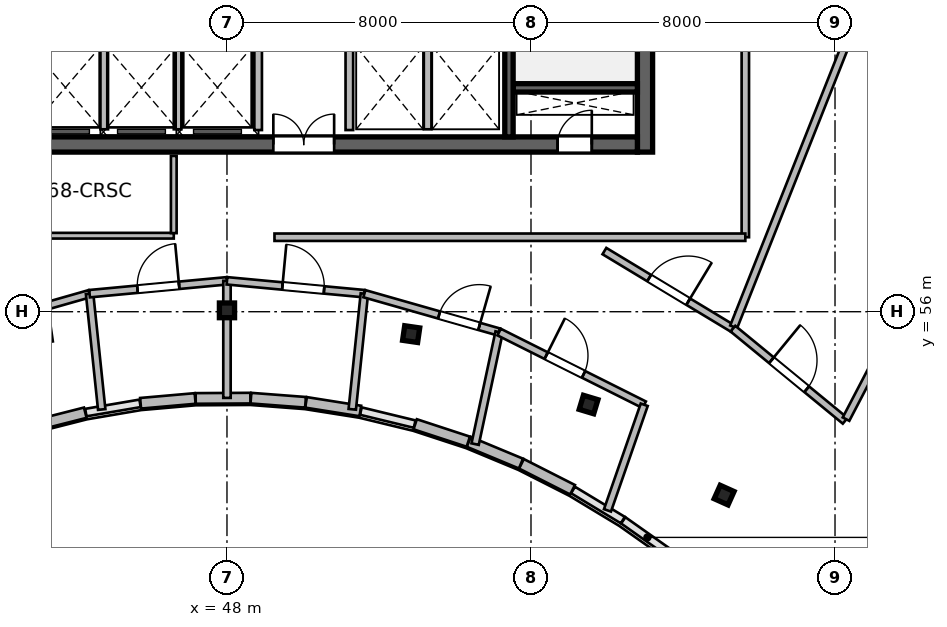
"""IFC4 building model, lengths in metres.
Left out: names, types, materials, properties, quantities, classifications, styles, units other than length and angle.
Written with IfcOpenShell. Run it as: python <this file> out.ifc"""

import sys

from ifc_helpers import new_model, si_unit, direction, frame, frame_2d, origin, origin_2d, place, context, subcontext, project, spatial, rectangle, i_section, extrude, source, transform, mapped, element, fill, save


model = new_model("IFC4")
c1 = context("Model", 3, precision=1e-05, world=origin(), true_north=direction((0.0, 1.0)))
c2 = subcontext(c1, "Body", "Model", "MODEL_VIEW")
j1 = project(units=[si_unit("LENGTHUNIT", "METRE"), si_unit("PLANEANGLEUNIT", "RADIAN")], contexts=[c1])
p1 = place(None, origin())
s1 = spatial("IfcSite", under=j1, at=p1, CompositionType="ELEMENT")
p2 = place(p1, origin())
s2 = spatial("IfcBuilding", under=s1, at=p2, CompositionType="ELEMENT")
p3 = place(p2, frame((0.0, 0.0, 279.6)))
s3 = spatial("IfcBuildingStorey", under=s2, at=p3, CompositionType="ELEMENT", Elevation=279.6)
m1 = source(origin(), c2, "Body", "SweptSolid", [
    extrude(rectangle(XDim=12.0, YDim=0.4, at=frame_2d((6.0, 0.0))), origin(), (0.0, 0.0, 1.0), 3.9),
])
p4 = place(p3, frame((59.0, 60.2, 0.0), z_axis=(0.0, 0.0, 1.0), x_axis=(0.0, 1.0, 0.0)))
e1 = element("IfcWall", 1, at=p4, inside=s3, PredefinedType="SHEAR", context=c2, shape_type="MappedRepresentation", body=[
    mapped(m1, transform((0.0, 0.0, 0.0), scale=1.0)),
])
m2 = source(origin(), c2, "Body", "SweptSolid", [
    extrude(rectangle(XDim=21.6, YDim=0.4, at=frame_2d((10.8, 0.0))), origin(), (0.0, 0.0, 1.0), 3.9),
])
p5 = place(p3, frame((37.2, 60.4, 0.0), z_axis=(0.0, 0.0, 1.0), x_axis=(1.0, 0.0, 0.0)))
e2 = element("IfcWall", 2, at=p5, inside=s3, PredefinedType="SHEAR", context=c2, shape_type="MappedRepresentation", body=[
    mapped(m2, transform((0.0, 0.0, 0.0), scale=1.0)),
])
p6 = place(p5, frame((1.1, 0.0, 0.0)))
e3 = element("IfcOpeningElement", 3, at=p6, cuts=e2, PredefinedType="OPENING", context=c2, shape_type="SweptSolid", body=[
    extrude(rectangle(XDim=1.15, YDim=2.15, at=frame_2d((0.575, 1.075))), frame((0.0, 0.21, 0.0), z_axis=(0.0, -1.0, 0.0), x_axis=(1.0, 0.0, 0.0)), (0.0, 0.0, 1.0), 0.42),
])
p7 = place(p5, frame((19.5, 0.0, 0.0)))
e4 = element("IfcOpeningElement", 4, at=p7, cuts=e2, PredefinedType="OPENING", context=c2, shape_type="SweptSolid", body=[
    extrude(rectangle(XDim=0.9, YDim=2.1, at=frame_2d((0.45, 1.05))), frame((0.0, 0.21, 0.0), z_axis=(0.0, -1.0, 0.0), x_axis=(1.0, 0.0, 0.0)), (0.0, 0.0, 1.0), 0.42),
])
p8 = place(p5, frame((12.02, 0.0, 0.0)))
e5 = element("IfcOpeningElement", 5, at=p8, cuts=e2, PredefinedType="OPENING", context=c2, shape_type="SweptSolid", body=[
    extrude(rectangle(XDim=1.6, YDim=2.15, at=frame_2d((0.8, 1.075))), frame((0.0, 0.21, 0.0), z_axis=(0.0, -1.0, 0.0), x_axis=(1.0, 0.0, 0.0)), (0.0, 0.0, 1.0), 0.42),
])
m3 = source(origin(), c2, "Body", "SweptSolid", [
    extrude(rectangle(XDim=3.27, YDim=0.22, at=frame_2d((1.635, 0.0))), origin(), (0.0, 0.0, 1.0), 3.9),
])
p9 = place(p3, frame((55.53, 61.89, 0.0), z_axis=(0.0, 0.0, 1.0), x_axis=(1.0, 0.0, 0.0)))
e6 = element("IfcWall", 6, at=p9, inside=s3, PredefinedType="SHEAR", context=c2, shape_type="MappedRepresentation", body=[
    mapped(m3, transform((0.0, 0.0, 0.0), scale=1.0)),
])
m4 = source(origin(), c2, "Body", "SweptSolid", [
    extrude(rectangle(XDim=11.2, YDim=0.22, at=frame_2d((5.6, 0.0))), origin(), (0.0, 0.0, 1.0), 3.9),
])
p10 = place(p3, frame((55.42, 60.6, 0.0), z_axis=(0.0, 0.0, 1.0), x_axis=(0.0, 1.0, 0.0)))
e7 = element("IfcWall", 7, at=p10, inside=s3, PredefinedType="SHEAR", context=c2, shape_type="MappedRepresentation", body=[
    mapped(m4, transform((0.0, 0.0, 0.0), scale=1.0)),
])
p11 = place(p10, frame((9.645, 0.0, 0.0)))
e8 = element("IfcOpeningElement", 8, at=p11, cuts=e7, PredefinedType="OPENING", context=c2, shape_type="SweptSolid", body=[
    extrude(rectangle(XDim=1.15, YDim=2.15, at=frame_2d((0.575, 1.075))), frame((0.0, 0.12, 0.0), z_axis=(0.0, -1.0, 0.0), x_axis=(1.0, 0.0, 0.0)), (0.0, 0.0, 1.0), 0.24),
])
m5 = source(origin(), c2, "Body", "SweptSolid", [
    extrude(i_section(OverallWidth=0.399, OverallDepth=0.387, WebThickness=0.021, FlangeThickness=0.033, at=origin_2d()), origin(), (0.0, 0.0, 1.0), 3.9),
])
for number, where, z_axis, x_axis in (
    (9, (48.0, 56.036, 0.0), (0.0, 0.0, 1.0), (0.0, 1.0, 0.0)),
    (10, (52.846, 55.411, 0.0), (0.0, 0.0, 1.0), (0.143, 0.99, 0.0)),
    (11, (57.515, 53.558, 0.0), (0.0, 0.0, 1.0), (0.289, 0.957, 0.0)),
    (12, (61.082, 51.175, 0.0), (0.0, 0.0, 1.0), (0.409, 0.912, 0.0)),
):
    element("IfcColumn", number, at=place(p3, frame(where, z_axis=z_axis, x_axis=x_axis)), inside=s3, PredefinedType="COLUMN", context=c2, shape_type="MappedRepresentation", body=[
        mapped(m5, transform((0.0, 0.0, 0.0), scale=1.0)),
    ])
m6 = source(origin(), c2, "Body", "SweptSolid", [
    extrude(rectangle(XDim=1.509, YDim=0.28, at=frame_2d((0.754, 0.0))), origin(), (0.0, 0.0, 1.0), 3.64),
])
p12 = place(p3, frame((57.094, 51.315, 0.0), z_axis=(0.0, 0.0, 1.0), x_axis=(-0.89169189228, 0.452642871635, 0.0)))
e13 = element("IfcWall", 13, at=p12, inside=s3, PredefinedType="SOLIDWALL", context=c2, shape_type="MappedRepresentation", body=[
    mapped(m6, transform((0.0, 0.0, 0.0), scale=1.0)),
])
m7 = source(origin(), c2, "Body", "SweptSolid", [
    extrude(rectangle(XDim=1.488, YDim=0.28, at=frame_2d((0.744, 0.0))), origin(), (0.0, 0.0, 1.0), 3.64),
])
p13 = place(p3, frame((55.736, 52.004, 0.0), z_axis=(0.0, 0.0, 1.0), x_axis=(-0.923261314935, 0.384172545017, 0.0)))
e14 = element("IfcWall", 14, at=p13, inside=s3, PredefinedType="SOLIDWALL", context=c2, shape_type="MappedRepresentation", body=[
    mapped(m7, transform((0.0, 0.0, 0.0), scale=1.0)),
])
m8 = source(origin(), c2, "Body", "SweptSolid", [
    extrude(rectangle(XDim=1.47, YDim=0.28, at=frame_2d((0.735, 0.0))), origin(), (0.0, 0.0, 1.0), 3.64),
])
p14 = place(p3, frame((54.35, 52.58, 0.0), z_axis=(0.0, 0.0, 1.0), x_axis=(-0.950248878954, 0.311491682145, 0.0)))
e15 = element("IfcWall", 15, at=p14, inside=s3, PredefinedType="SOLIDWALL", context=c2, shape_type="MappedRepresentation", body=[
    mapped(m8, transform((0.0, 0.0, 0.0), scale=1.0)),
])
m9 = source(origin(), c2, "Body", "SweptSolid", [
    extrude(rectangle(XDim=1.446, YDim=0.28, at=frame_2d((0.723, 0.0))), origin(), (0.0, 0.0, 1.0), 3.64),
])
p15 = place(p3, frame((51.509, 53.388, 0.0), z_axis=(0.0, 0.0, 1.0), x_axis=(-0.987650460941, 0.156673440642, 0.0)))
e16 = element("IfcWall", 16, at=p15, inside=s3, PredefinedType="SOLIDWALL", context=c2, shape_type="MappedRepresentation", body=[
    mapped(m9, transform((0.0, 0.0, 0.0), scale=1.0)),
])
m10 = source(origin(), c2, "Body", "SweptSolid", [
    extrude(rectangle(XDim=1.44, YDim=0.28, at=frame_2d((0.72, 0.0))), origin(), (0.0, 0.0, 1.0), 3.64),
])
p16 = place(p3, frame((50.066, 53.616, 0.0), z_axis=(0.0, 0.0, 1.0), x_axis=(-0.997124860794, 0.075776064736, 0.0)))
e17 = element("IfcWall", 17, at=p16, inside=s3, PredefinedType="SOLIDWALL", context=c2, shape_type="MappedRepresentation", body=[
    mapped(m10, transform((0.0, 0.0, 0.0), scale=1.0)),
])
m11 = source(origin(), c2, "Body", "SweptSolid", [
    extrude(rectangle(XDim=1.438, YDim=0.28, at=frame_2d((0.719, 0.0))), origin(), (0.0, 0.0, 1.0), 3.64),
])
p17 = place(p3, frame((48.615, 53.726, 0.0), z_axis=(0.0, 0.0, 1.0), x_axis=(-0.999982357135, -0.005940153174, 0.0)))
e18 = element("IfcWall", 18, at=p17, inside=s3, PredefinedType="SOLIDWALL", context=c2, shape_type="MappedRepresentation", body=[
    mapped(m11, transform((0.0, 0.0, 0.0), scale=1.0)),
])
m12 = source(origin(), c2, "Body", "SweptSolid", [
    extrude(rectangle(XDim=1.441, YDim=0.28, at=frame_2d((0.72, 0.0))), origin(), (0.0, 0.0, 1.0), 3.64),
])
p18 = place(p3, frame((47.162, 53.717, 0.0), z_axis=(0.0, 0.0, 1.0), x_axis=(-0.99617032352, -0.087433898101, 0.0)))
e19 = element("IfcWall", 19, at=p18, inside=s3, PredefinedType="SOLIDWALL", context=c2, shape_type="MappedRepresentation", body=[
    mapped(m12, transform((0.0, 0.0, 0.0), scale=1.0)),
])
m13 = source(origin(), c2, "Body", "SweptSolid", [
    extrude(rectangle(XDim=1.458, YDim=0.28, at=frame_2d((0.729, 0.0))), origin(), (0.0, 0.0, 1.0), 3.64),
])
p19 = place(p3, frame((44.271, 53.343, 0.0), z_axis=(0.0, 0.0, 1.0), x_axis=(-0.969109544438, -0.246630677083, 0.0)))
e20 = element("IfcWall", 20, at=p19, inside=s3, PredefinedType="SOLIDWALL", context=c2, shape_type="MappedRepresentation", body=[
    mapped(m13, transform((0.0, 0.0, 0.0), scale=1.0)),
])
m14 = source(origin(), c2, "Body", "SweptSolid", [
    extrude(rectangle(XDim=2.24, YDim=0.2, at=frame_2d((1.12, 0.0))), origin(), (0.0, 0.0, 1.0), 3.64),
])
for number, where, z_axis, x_axis in (
    (21, (48.82, 60.78, 0.0), (0.0, 0.0, 1.0), (0.0, 1.0, 0.0)),
    (22, (51.22, 60.78, 0.0), (0.0, 0.0, 1.0), (0.0, 1.0, 0.0)),
):
    element("IfcWall", number, at=place(p3, frame(where, z_axis=z_axis, x_axis=x_axis)), inside=s3, PredefinedType="SOLIDWALL", context=c2, shape_type="MappedRepresentation", body=[
        mapped(m14, transform((0.0, 0.0, 0.0), scale=1.0)),
    ])
m15 = source(origin(), c2, "Body", "SweptSolid", [
    extrude(rectangle(XDim=2.2, YDim=0.2, at=frame_2d((1.1, 0.0))), origin(), (0.0, 0.0, 1.0), 3.64),
])
for number, where, z_axis, x_axis in (
    (23, (44.77, 60.8, 0.0), (0.0, 0.0, 1.0), (0.0, 1.0, 0.0)),
    (24, (46.7, 60.8, 0.0), (0.0, 0.0, 1.0), (0.0, 1.0, 0.0)),
    (25, (53.28, 60.8, 0.0), (0.0, 0.0, 1.0), (0.0, 1.0, 0.0)),
):
    element("IfcWall", number, at=place(p3, frame(where, z_axis=z_axis, x_axis=x_axis)), inside=s3, PredefinedType="SOLIDWALL", context=c2, shape_type="MappedRepresentation", body=[
        mapped(m15, transform((0.0, 0.0, 0.0), scale=1.0)),
    ])
m16 = source(origin(), c2, "Body", "SweptSolid", [
    extrude(rectangle(XDim=5.4, YDim=0.15, at=frame_2d((2.7, 0.0))), origin(), (0.0, 0.0, 1.0), 3.64),
])
p20 = place(p3, frame((41.2, 58.0, 0.0), z_axis=(0.0, 0.0, 1.0), x_axis=(1.0, 0.0, 0.0)))
e26 = element("IfcWall", 26, at=p20, inside=s3, PredefinedType="PARTITIONING", context=c2, shape_type="MappedRepresentation", body=[
    mapped(m16, transform((0.0, 0.0, 0.0), scale=1.0)),
])
m17 = source(origin(), c2, "Body", "SweptSolid", [
    extrude(rectangle(XDim=2.033, YDim=0.15, at=frame_2d((1.016, 0.0))), origin(), (0.0, 0.0, 1.0), 3.64),
])
p21 = place(p3, frame((46.6, 58.067, 0.0), z_axis=(0.0, 0.0, 1.0), x_axis=(0.0, 1.0, 0.0)))
e27 = element("IfcWall", 27, at=p21, inside=s3, PredefinedType="PARTITIONING", context=c2, shape_type="MappedRepresentation", body=[
    mapped(m17, transform((0.0, 0.0, 0.0), scale=1.0)),
])
m18 = source(origin(), c2, "Body", "SweptSolid", [
    extrude(rectangle(XDim=3.687, YDim=0.195, at=frame_2d((1.843, 0.0))), origin(), (0.0, 0.0, 1.0), 3.64),
])
p22 = place(p3, frame((40.839, 55.465, 0.0), z_axis=(0.0, 0.0, 1.0), x_axis=(0.961753532248, 0.27391630694, 0.0)))
e28 = element("IfcWall", 28, at=p22, inside=s3, PredefinedType="PARTITIONING", context=c2, shape_type="MappedRepresentation", body=[
    mapped(m18, transform((0.0, 0.0, 0.0), scale=1.0)),
])
p23 = place(p22, frame((0.543, 0.0, 0.0)))
e29 = element("IfcOpeningElement", 29, at=p23, cuts=e28, PredefinedType="OPENING", context=c2, shape_type="SweptSolid", body=[
    extrude(rectangle(XDim=1.1, YDim=2.15, at=frame_2d((0.55, 1.075))), frame((0.0, 0.107, 0.0), z_axis=(0.0, -1.0, 0.0), x_axis=(1.0, 0.0, 0.0)), (0.0, 0.0, 1.0), 0.215),
])
m19 = source(origin(), c2, "Body", "SweptSolid", [
    extrude(rectangle(XDim=3.063, YDim=0.195, at=frame_2d((1.532, 0.0))), origin(), (0.0, 0.0, 1.0), 3.64),
])
p24 = place(p3, frame((44.704, 53.427, 0.0), z_axis=(0.0, 0.0, 1.0), x_axis=(-0.104315578516, 0.994544247421, 0.0)))
e30 = element("IfcWall", 30, at=p24, inside=s3, PredefinedType="PARTITIONING", context=c2, shape_type="MappedRepresentation", body=[
    mapped(m19, transform((0.0, 0.0, 0.0), scale=1.0)),
])
m20 = source(origin(), c2, "Body", "SweptSolid", [
    extrude(rectangle(XDim=3.632, YDim=0.195, at=frame_2d((1.816, 0.0))), origin(), (0.0, 0.0, 1.0), 3.64),
])
p25 = place(p3, frame((44.384, 56.474, 0.0), z_axis=(0.0, 0.0, 1.0), x_axis=(0.99563695898, 0.093311552942, 0.0)))
e31 = element("IfcWall", 31, at=p25, inside=s3, PredefinedType="PARTITIONING", context=c2, shape_type="MappedRepresentation", body=[
    mapped(m20, transform((0.0, 0.0, 0.0), scale=1.0)),
])
p26 = place(p25, frame((1.266, 0.0, 0.0)))
e32 = element("IfcOpeningElement", 32, at=p26, cuts=e31, PredefinedType="OPENING", context=c2, shape_type="SweptSolid", body=[
    extrude(rectangle(XDim=1.1, YDim=2.15, at=frame_2d((0.55, 1.075))), frame((0.0, 0.107, 0.0), z_axis=(0.0, -1.0, 0.0), x_axis=(1.0, 0.0, 0.0)), (0.0, 0.0, 1.0), 0.215),
])
m21 = source(origin(), c2, "Body", "SweptSolid", [
    extrude(rectangle(XDim=3.081, YDim=0.195, at=frame_2d((1.54, 0.0))), origin(), (0.0, 0.0, 1.0), 3.314),
])
p27 = place(p3, frame((48.0, 53.733, 0.0), z_axis=(0.0, 0.0, 1.0), x_axis=(0.0, 1.0, 0.0)))
e33 = element("IfcWall", 33, at=p27, inside=s3, PredefinedType="PARTITIONING", context=c2, shape_type="MappedRepresentation", body=[
    mapped(m21, transform((0.0, 0.0, 0.0), scale=1.0)),
])
p28 = place(p3, frame((48.0, 56.813, 0.0), z_axis=(0.0, 0.0, 1.0), x_axis=(0.99563695898, -0.093311552942, 0.0)))
e34 = element("IfcWall", 34, at=p28, inside=s3, PredefinedType="PARTITIONING", context=c2, shape_type="MappedRepresentation", body=[
    mapped(m20, transform((0.0, 0.0, 0.0), scale=1.0)),
])
p29 = place(p28, frame((1.466, 0.0, 0.0)))
e35 = element("IfcOpeningElement", 35, at=p29, cuts=e34, PredefinedType="OPENING", context=c2, shape_type="SweptSolid", body=[
    extrude(rectangle(XDim=1.1, YDim=2.15, at=frame_2d((0.55, 1.075))), frame((0.0, 0.107, 0.0), z_axis=(0.0, -1.0, 0.0), x_axis=(1.0, 0.0, 0.0)), (0.0, 0.0, 1.0), 0.215),
])
m22 = source(origin(), c2, "Body", "SweptSolid", [
    extrude(rectangle(XDim=3.059, YDim=0.195, at=frame_2d((1.53, 0.0))), origin(), (0.0, 0.0, 1.0), 3.64),
])
p30 = place(p3, frame((51.297, 53.432, 0.0), z_axis=(0.0, 0.0, 1.0), x_axis=(0.10430673596, 0.994545174858, 0.0)))
e36 = element("IfcWall", 36, at=p30, inside=s3, PredefinedType="PARTITIONING", context=c2, shape_type="MappedRepresentation", body=[
    mapped(m22, transform((0.0, 0.0, 0.0), scale=1.0)),
])
p31 = place(p3, frame((51.616, 56.474, 0.0), z_axis=(0.0, 0.0, 1.0), x_axis=(0.961753532248, -0.27391630694, 0.0)))
e37 = element("IfcWall", 37, at=p31, inside=s3, PredefinedType="PARTITIONING", context=c2, shape_type="MappedRepresentation", body=[
    mapped(m18, transform((0.0, 0.0, 0.0), scale=1.0)),
])
p32 = place(p31, frame((2.043, 0.0, 0.0)))
e38 = element("IfcOpeningElement", 38, at=p32, cuts=e37, PredefinedType="OPENING", context=c2, shape_type="SweptSolid", body=[
    extrude(rectangle(XDim=1.1, YDim=2.15, at=frame_2d((0.55, 1.075))), frame((0.0, 0.107, 0.0), z_axis=(0.0, -1.0, 0.0), x_axis=(1.0, 0.0, 0.0)), (0.0, 0.0, 1.0), 0.215),
])
m23 = source(origin(), c2, "Body", "SweptSolid", [
    extrude(rectangle(XDim=3.015, YDim=0.195, at=frame_2d((1.507, 0.0))), origin(), (0.0, 0.0, 1.0), 3.64),
])
p33 = place(p3, frame((54.53, 52.517, 0.0), z_axis=(0.0, 0.0, 1.0), x_axis=(0.209258086484, 0.977860446711, 0.0)))
e39 = element("IfcWall", 39, at=p33, inside=s3, PredefinedType="PARTITIONING", context=c2, shape_type="MappedRepresentation", body=[
    mapped(m23, transform((0.0, 0.0, 0.0), scale=1.0)),
])
m24 = source(origin(), c2, "Body", "SweptSolid", [
    extrude(rectangle(XDim=4.271, YDim=0.195, at=frame_2d((2.135, 0.0))), origin(), (0.0, 0.0, 1.0), 3.64),
])
p34 = place(p3, frame((55.161, 55.465, 0.0), z_axis=(0.0, 0.0, 1.0), x_axis=(0.894061035522, -0.447945158207, 0.0)))
e40 = element("IfcWall", 40, at=p34, inside=s3, PredefinedType="PARTITIONING", context=c2, shape_type="MappedRepresentation", body=[
    mapped(m24, transform((0.0, 0.0, 0.0), scale=1.0)),
])
p35 = place(p34, frame((1.385, 0.0, 0.0)))
e41 = element("IfcOpeningElement", 41, at=p35, cuts=e40, PredefinedType="OPENING", context=c2, shape_type="SweptSolid", body=[
    extrude(rectangle(XDim=1.1, YDim=2.15, at=frame_2d((0.55, 1.075))), frame((0.0, 0.107, 0.0), z_axis=(0.0, -1.0, 0.0), x_axis=(1.0, 0.0, 0.0)), (0.0, 0.0, 1.0), 0.215),
])
m25 = source(origin(), c2, "Body", "SweptSolid", [
    extrude(rectangle(XDim=2.942, YDim=0.195, at=frame_2d((1.471, 0.0))), origin(), (0.0, 0.0, 1.0), 3.64),
])
p36 = place(p3, frame((58.013, 50.773, 0.0), z_axis=(0.0, 0.0, 1.0), x_axis=(0.328623620494, 0.944460965871, 0.0)))
e42 = element("IfcWall", 42, at=p36, inside=s3, PredefinedType="PARTITIONING", context=c2, shape_type="MappedRepresentation", body=[
    mapped(m25, transform((0.0, 0.0, 0.0), scale=1.0)),
])
m26 = source(origin(), c2, "Body", "SweptSolid", [
    extrude(rectangle(XDim=3.951, YDim=0.195, at=frame_2d((1.975, 0.0))), origin(), (0.0, 0.0, 1.0), 3.64),
])
p37 = place(p3, frame((57.932, 57.596, 0.0), z_axis=(0.0, 0.0, 1.0), x_axis=(0.856137696849, -0.51674775668, 0.0)))
e43 = element("IfcWall", 43, at=p37, inside=s3, PredefinedType="PARTITIONING", context=c2, shape_type="MappedRepresentation", body=[
    mapped(m26, transform((0.0, 0.0, 0.0), scale=1.0)),
])
p38 = place(p37, frame((1.375, 0.0, 0.0)))
e44 = element("IfcOpeningElement", 44, at=p38, cuts=e43, PredefinedType="OPENING", context=c2, shape_type="SweptSolid", body=[
    extrude(rectangle(XDim=1.2, YDim=2.15, at=frame_2d((0.6, 1.075))), frame((0.0, 0.107, 0.0), z_axis=(0.0, -1.0, 0.0), x_axis=(1.0, 0.0, 0.0)), (0.0, 0.0, 1.0), 0.215),
])
m27 = source(origin(), c2, "Body", "SweptSolid", [
    extrude(rectangle(XDim=17.664, YDim=0.195, at=frame_2d((8.832, 0.0))), origin(), (0.0, 0.0, 1.0), 3.64),
])
p39 = place(p3, frame((61.333, 55.602, 0.0), z_axis=(0.0, 0.0, 1.0), x_axis=(0.368827513738, 0.929497856431, 0.0)))
e45 = element("IfcWall", 45, at=p39, inside=s3, PredefinedType="PARTITIONING", context=c2, shape_type="MappedRepresentation", body=[
    mapped(m27, transform((0.0, 0.0, 0.0), scale=1.0)),
])
m28 = source(origin(), c2, "Body", "SweptSolid", [
    extrude(rectangle(XDim=3.82, YDim=0.195, at=frame_2d((1.91, 0.0))), origin(), (0.0, 0.0, 1.0), 3.64),
])
p40 = place(p3, frame((61.314, 55.554, 0.0), z_axis=(0.0, 0.0, 1.0), x_axis=(0.772805728445, -0.63464266015, 0.0)))
e46 = element("IfcWall", 46, at=p40, inside=s3, PredefinedType="PARTITIONING", context=c2, shape_type="MappedRepresentation", body=[
    mapped(m28, transform((0.0, 0.0, 0.0), scale=1.0)),
])
p41 = place(p40, frame((1.31, 0.0, 0.0)))
e47 = element("IfcOpeningElement", 47, at=p41, cuts=e46, PredefinedType="OPENING", context=c2, shape_type="SweptSolid", body=[
    extrude(rectangle(XDim=1.2, YDim=2.15, at=frame_2d((0.6, 1.075))), frame((0.0, 0.107, 0.0), z_axis=(0.0, -1.0, 0.0), x_axis=(1.0, 0.0, 0.0)), (0.0, 0.0, 1.0), 0.215),
])
m29 = source(origin(), c2, "Body", "SweptSolid", [
    extrude(rectangle(XDim=16.43, YDim=0.195, at=frame_2d((8.215, 0.0))), origin(), (0.0, 0.0, 1.0), 3.64),
])
p42 = place(p3, frame((64.29, 53.174, 0.0), z_axis=(0.0, 0.0, 1.0), x_axis=(0.463119459371, 0.886295868405, 0.0)))
e48 = element("IfcWall", 48, at=p42, inside=s3, PredefinedType="PARTITIONING", context=c2, shape_type="MappedRepresentation", body=[
    mapped(m29, transform((0.0, 0.0, 0.0), scale=1.0)),
])
m30 = source(origin(), c2, "Body", "SweptSolid", [
    extrude(rectangle(XDim=17.693, YDim=0.195, at=frame_2d((8.847, 0.0))), origin(), (0.0, 0.0, 1.0), 3.64),
])
p43 = place(p3, frame((61.64, 57.96, 0.0), z_axis=(0.0, 0.0, 1.0), x_axis=(0.0, 1.0, 0.0)))
e49 = element("IfcWall", 49, at=p43, inside=s3, PredefinedType="PARTITIONING", context=c2, shape_type="MappedRepresentation", body=[
    mapped(m30, transform((0.0, 0.0, 0.0), scale=1.0)),
])
m31 = source(origin(), c2, "Body", "SweptSolid", [
    extrude(rectangle(XDim=12.39, YDim=0.195, at=frame_2d((6.195, 0.0))), origin(), (0.0, 0.0, 1.0), 3.64),
])
p44 = place(p3, frame((49.25, 57.96, 0.0), z_axis=(0.0, 0.0, 1.0), x_axis=(1.0, 0.0, 0.0)))
e50 = element("IfcWall", 50, at=p44, inside=s3, PredefinedType="PARTITIONING", context=c2, shape_type="MappedRepresentation", body=[
    mapped(m31, transform((0.0, 0.0, 0.0), scale=1.0)),
])
m32 = source(origin(), c2, "Body", "SweptSolid", [
    extrude(rectangle(XDim=0.9, YDim=2.1, at=frame_2d((0.45, 1.05))), frame((0.0, 0.025, 0.0), z_axis=(0.0, -1.0, 0.0), x_axis=(1.0, 0.0, 0.0)), (0.0, 0.0, 1.0), 0.05),
])
p45 = place(p7, origin())
e51 = element("IfcDoor", 51, at=p45, inside=s3, OperationType="SINGLE_SWING_RIGHT", PredefinedType="DOOR", context=c2, shape_type="MappedRepresentation", body=[
    mapped(m32, transform((0.0, 0.0, 0.0), scale=1.0)),
])
fill(e4, e51)
m33 = source(origin(), c2, "Body", "SweptSolid", [
    extrude(rectangle(XDim=1.6, YDim=2.15, at=frame_2d((0.8, 1.075))), frame((0.0, 0.025, 0.0), z_axis=(0.0, -1.0, 0.0), x_axis=(1.0, 0.0, 0.0)), (0.0, 0.0, 1.0), 0.05),
])
p46 = place(p8, origin())
e52 = element("IfcDoor", 52, at=p46, inside=s3, OperationType="DOUBLE_DOOR_SINGLE_SWING", PredefinedType="DOOR", context=c2, shape_type="MappedRepresentation", body=[
    mapped(m33, transform((0.0, 0.0, 0.0), scale=1.0)),
])
fill(e5, e52)
m34 = source(origin(), c2, "Body", "SweptSolid", [
    extrude(rectangle(XDim=1.1, YDim=2.15, at=frame_2d((0.55, 1.075))), frame((0.0, 0.025, 0.0), z_axis=(0.0, -1.0, 0.0), x_axis=(1.0, 0.0, 0.0)), (0.0, 0.0, 1.0), 0.05),
])
p47 = place(p26, origin())
e53 = element("IfcDoor", 53, at=p47, inside=s3, OperationType="SINGLE_SWING_RIGHT", PredefinedType="DOOR", context=c2, shape_type="MappedRepresentation", body=[
    mapped(m34, transform((0.0, 0.0, 0.0), scale=1.0)),
])
fill(e32, e53)
p48 = place(p29, origin())
e54 = element("IfcDoor", 54, at=p48, inside=s3, OperationType="SINGLE_SWING_LEFT", PredefinedType="DOOR", context=c2, shape_type="MappedRepresentation", body=[
    mapped(m34, transform((0.0, 0.0, 0.0), scale=1.0)),
])
fill(e35, e54)
p49 = place(p32, origin())
e55 = element("IfcDoor", 55, at=p49, inside=s3, OperationType="SINGLE_SWING_RIGHT", PredefinedType="DOOR", context=c2, shape_type="MappedRepresentation", body=[
    mapped(m34, transform((0.0, 0.0, 0.0), scale=1.0)),
])
fill(e38, e55)
p50 = place(p35, origin())
e56 = element("IfcDoor", 56, at=p50, inside=s3, OperationType="SINGLE_SWING_LEFT", PredefinedType="DOOR", context=c2, shape_type="MappedRepresentation", body=[
    mapped(m34, transform((0.0, 0.0, 0.0), scale=1.0)),
])
fill(e41, e56)
m35 = source(origin(), c2, "Body", "SweptSolid", [
    extrude(rectangle(XDim=1.2, YDim=2.15, at=frame_2d((0.6, 1.075))), frame((0.0, 0.025, 0.0), z_axis=(0.0, -1.0, 0.0), x_axis=(1.0, 0.0, 0.0)), (0.0, 0.0, 1.0), 0.05),
])
p51 = place(p38, origin())
e57 = element("IfcDoor", 57, at=p51, inside=s3, OperationType="SINGLE_SWING_RIGHT", PredefinedType="DOOR", context=c2, shape_type="MappedRepresentation", body=[
    mapped(m35, transform((0.0, 0.0, 0.0), scale=1.0)),
])
fill(e44, e57)
p52 = place(p41, origin())
e58 = element("IfcDoor", 58, at=p52, inside=s3, OperationType="SINGLE_SWING_LEFT", PredefinedType="DOOR", context=c2, shape_type="MappedRepresentation", body=[
    mapped(m35, transform((0.0, 0.0, 0.0), scale=1.0)),
])
fill(e47, e58)
save(model, sys.argv[1])
